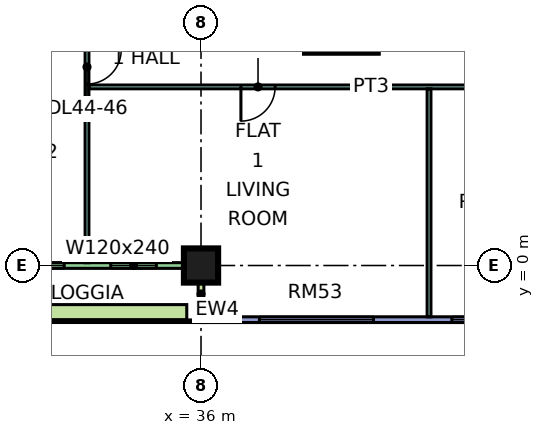
"""IFC4 building model, lengths in metres.
Left out: names, types, materials, properties, quantities, classifications, styles, units other than length and angle.
Written with IfcOpenShell. Run it as: python <this file> out.ifc"""

import sys

from ifc_helpers import new_model, si_unit, direction, frame, frame_2d, origin, origin_2d, place, context, subcontext, project, spatial, rectangle, extrude, element, fill, save


model = new_model("IFC4")
c1 = context("Model", 3, precision=1e-05, world=origin(), true_north=direction((0.0, 1.0)))
c2 = subcontext(c1, "Body", "Model", "MODEL_VIEW")
j1 = project(units=[si_unit("LENGTHUNIT", "METRE"), si_unit("PLANEANGLEUNIT", "RADIAN")], contexts=[c1])
p1 = place(None, origin())
s1 = spatial("IfcSite", under=j1, at=p1, CompositionType="ELEMENT")
p2 = place(p1, origin())
s2 = spatial("IfcBuilding", under=s1, at=p2, CompositionType="ELEMENT")
p3 = place(p2, frame((0.0, 0.0, 191.15)))
s3 = spatial("IfcBuildingStorey", under=s2, at=p3, CompositionType="ELEMENT", Elevation=191.15)
p4 = place(p3, frame((36.0, 0.0, 0.0), z_axis=(0.0, 0.0, 1.0), x_axis=(1.0, 0.0, 0.0)))
e1 = element("IfcColumn", 1, at=p4, inside=s3, PredefinedType="COLUMN", context=c2, shape_type="SweptSolid", body=[
    extrude(rectangle(XDim=0.9, YDim=0.9, at=origin_2d()), origin(), (0.0, 0.0, 1.0), 3.75),
])
p5 = place(p3, frame((37.2, 5.725, 0.0), z_axis=(0.0, 0.0, 1.0), x_axis=(1.0, 0.0, 0.0)))
e2 = element("IfcWall", 2, at=p5, inside=s3, PredefinedType="SHEAR", context=c2, shape_type="SweptSolid", body=[
    extrude(rectangle(XDim=3.45, YDim=0.25, at=frame_2d((1.725, 0.0))), origin(), (0.0, 0.0, 1.0), 3.75),
])
p6 = place(p3, frame((24.075, 0.0, 0.0), z_axis=(0.0, 0.0, 1.0), x_axis=(1.0, 0.0, 0.0)))
e3 = element("IfcWall", 3, at=p6, inside=s3, PredefinedType="SOLIDWALL", context=c2, shape_type="SweptSolid", body=[
    extrude(rectangle(XDim=11.85, YDim=0.15, at=frame_2d((5.925, 0.0))), origin(), (0.0, 0.0, 1.0), 3.35),
])
p7 = place(p6, frame((1.1, 0.0, 0.0)))
e4 = element("IfcOpeningElement", 4, at=p7, cuts=e3, PredefinedType="OPENING", context=c2, shape_type="SweptSolid", body=[
    extrude(rectangle(XDim=1.2, YDim=2.4, at=frame_2d((0.6, 1.2))), frame((0.0, 0.085, 0.0), z_axis=(0.0, -1.0, 0.0), x_axis=(1.0, 0.0, 0.0)), (0.0, 0.0, 1.0), 0.17),
])
p8 = place(p6, frame((3.525, 0.0, 0.45)))
e5 = element("IfcOpeningElement", 5, at=p8, cuts=e3, PredefinedType="OPENING", context=c2, shape_type="SweptSolid", body=[
    extrude(rectangle(XDim=1.8, YDim=2.4, at=frame_2d((0.9, 1.2))), frame((0.0, 0.085, 0.0), z_axis=(0.0, -1.0, 0.0), x_axis=(1.0, 0.0, 0.0)), (0.0, 0.0, 1.0), 0.17),
])
p9 = place(p6, frame((6.525, 0.0, 0.45)))
e6 = element("IfcOpeningElement", 6, at=p9, cuts=e3, PredefinedType="OPENING", context=c2, shape_type="SweptSolid", body=[
    extrude(rectangle(XDim=1.8, YDim=2.4, at=frame_2d((0.9, 1.2))), frame((0.0, 0.085, 0.0), z_axis=(0.0, -1.0, 0.0), x_axis=(1.0, 0.0, 0.0)), (0.0, 0.0, 1.0), 0.17),
])
p10 = place(p6, frame((9.55, 0.0, 0.45)))
e7 = element("IfcOpeningElement", 7, at=p10, cuts=e3, PredefinedType="OPENING", context=c2, shape_type="SweptSolid", body=[
    extrude(rectangle(XDim=1.2, YDim=2.4, at=frame_2d((0.6, 1.2))), frame((0.0, 0.085, 0.0), z_axis=(0.0, -1.0, 0.0), x_axis=(1.0, 0.0, 0.0)), (0.0, 0.0, 1.0), 0.17),
])
p11 = place(p3, frame((36.0, -1.5, 0.0), z_axis=(0.0, 0.0, 1.0), x_axis=(0.0, 1.0, 0.0)))
e8 = element("IfcWall", 8, at=p11, inside=s3, PredefinedType="SOLIDWALL", context=c2, shape_type="SweptSolid", body=[
    extrude(rectangle(XDim=1.5, YDim=0.15, at=frame_2d((0.75, 0.0))), origin(), (0.0, 0.0, 1.0), 3.35),
])
p12 = place(p3, frame((36.075, -1.425, 0.0), z_axis=(0.0, 0.0, 1.0), x_axis=(1.0, 0.0, 0.0)))
e9 = element("IfcWall", 9, at=p12, inside=s3, PredefinedType="SOLIDWALL", context=c2, shape_type="SweptSolid", body=[
    extrude(rectangle(XDim=11.85, YDim=0.15, at=frame_2d((5.925, 0.0))), origin(), (0.0, 0.0, 1.0), 3.35),
])
p13 = place(p12, frame((1.462, 0.0, 0.45)))
e10 = element("IfcOpeningElement", 10, at=p13, cuts=e9, PredefinedType="OPENING", context=c2, shape_type="SweptSolid", body=[
    extrude(rectangle(XDim=3.0, YDim=2.4, at=frame_2d((1.5, 1.2))), frame((0.0, 0.085, 0.0), z_axis=(0.0, -1.0, 0.0), x_axis=(1.0, 0.0, 0.0)), (0.0, 0.0, 1.0), 0.17),
])
p14 = place(p12, frame((6.525, 0.0, 0.45)))
e11 = element("IfcOpeningElement", 11, at=p14, cuts=e9, PredefinedType="OPENING", context=c2, shape_type="SweptSolid", body=[
    extrude(rectangle(XDim=1.8, YDim=2.4, at=frame_2d((0.9, 1.2))), frame((0.0, 0.085, 0.0), z_axis=(0.0, -1.0, 0.0), x_axis=(1.0, 0.0, 0.0)), (0.0, 0.0, 1.0), 0.17),
])
p15 = place(p12, frame((9.488, 0.0, 0.45)))
e12 = element("IfcOpeningElement", 12, at=p15, cuts=e9, PredefinedType="OPENING", context=c2, shape_type="SweptSolid", body=[
    extrude(rectangle(XDim=1.8, YDim=2.4, at=frame_2d((0.9, 1.2))), frame((0.0, 0.085, 0.0), z_axis=(0.0, -1.0, 0.0), x_axis=(1.0, 0.0, 0.0)), (0.0, 0.0, 1.0), 0.17),
])
p16 = place(p3, frame((24.375, -1.229, 0.0), z_axis=(0.0, 0.0, 1.0), x_axis=(1.0, 0.0, 0.0)))
e13 = element("IfcWall", 13, at=p16, inside=s3, PredefinedType="SOLIDWALL", context=c2, shape_type="SweptSolid", body=[
    extrude(rectangle(XDim=11.25, YDim=0.4, at=frame_2d((5.625, 0.0))), origin(), (0.0, 0.0, 1.0), 0.7),
])
p17 = place(p3, frame((33.0, 0.074, 0.0), z_axis=(0.0, 0.0, 1.0), x_axis=(0.0, 1.0, 0.0)))
e14 = element("IfcWall", 14, at=p17, inside=s3, PredefinedType="PARTITIONING", context=c2, shape_type="SweptSolid", body=[
    extrude(rectangle(XDim=5.751, YDim=0.1, at=frame_2d((2.875, 0.0))), origin(), (0.0, 0.0, 1.0), 3.35),
])
p18 = place(p17, frame((4.701, 0.0, 0.0)))
e15 = element("IfcOpeningElement", 15, at=p18, cuts=e14, PredefinedType="OPENING", context=c2, shape_type="SweptSolid", body=[
    extrude(rectangle(XDim=0.9, YDim=2.1, at=frame_2d((0.45, 1.05))), frame((0.0, 0.06, 0.0), z_axis=(0.0, -1.0, 0.0), x_axis=(1.0, 0.0, 0.0)), (0.0, 0.0, 1.0), 0.12),
])
p19 = place(p3, frame((33.05, 4.7, 0.0), z_axis=(0.0, 0.0, 1.0), x_axis=(1.0, 0.0, 0.0)))
e16 = element("IfcWall", 16, at=p19, inside=s3, PredefinedType="PARTITIONING", context=c2, shape_type="SweptSolid", body=[
    extrude(rectangle(XDim=14.85, YDim=0.1, at=frame_2d((7.425, 0.0))), origin(), (0.0, 0.0, 1.0), 3.35),
])
p20 = place(p19, frame((10.0, 0.0, 0.0)))
e17 = element("IfcOpeningElement", 17, at=p20, cuts=e16, PredefinedType="OPENING", context=c2, shape_type="SweptSolid", body=[
    extrude(rectangle(XDim=0.9, YDim=2.1, at=frame_2d((0.45, 1.05))), frame((0.0, 0.06, 0.0), z_axis=(0.0, -1.0, 0.0), x_axis=(1.0, 0.0, 0.0)), (0.0, 0.0, 1.0), 0.12),
])
p21 = place(p19, frame((13.0, 0.0, 0.0)))
e18 = element("IfcOpeningElement", 18, at=p21, cuts=e16, PredefinedType="OPENING", context=c2, shape_type="SweptSolid", body=[
    extrude(rectangle(XDim=0.9, YDim=2.1, at=frame_2d((0.45, 1.05))), frame((0.0, 0.06, 0.0), z_axis=(0.0, -1.0, 0.0), x_axis=(1.0, 0.0, 0.0)), (0.0, 0.0, 1.0), 0.12),
])
p22 = place(p19, frame((4.0, 0.0, 0.0)))
e19 = element("IfcOpeningElement", 19, at=p22, cuts=e16, PredefinedType="OPENING", context=c2, shape_type="SweptSolid", body=[
    extrude(rectangle(XDim=0.9, YDim=2.1, at=frame_2d((0.45, 1.05))), frame((0.0, 0.06, 0.0), z_axis=(0.0, -1.0, 0.0), x_axis=(1.0, 0.0, 0.0)), (0.0, 0.0, 1.0), 0.12),
])
p23 = place(p3, frame((42.0, -1.35, 0.0), z_axis=(0.0, 0.0, 1.0), x_axis=(0.0, 1.0, 0.0)))
e20 = element("IfcWall", 20, at=p23, inside=s3, PredefinedType="PARTITIONING", context=c2, shape_type="SweptSolid", body=[
    extrude(rectangle(XDim=6.0, YDim=0.1, at=frame_2d((3.0, 0.0))), origin(), (0.0, 0.0, 1.0), 3.35),
])
p24 = place(p9, origin())
e21 = element("IfcWindow", 21, at=p24, inside=s3, PartitioningType="SINGLE_PANEL", PredefinedType="WINDOW", context=c2, shape_type="SweptSolid", body=[
    extrude(rectangle(XDim=1.8, YDim=2.4, at=frame_2d((0.9, 1.2))), frame((0.0, 0.03, 0.0), z_axis=(0.0, -1.0, 0.0), x_axis=(1.0, 0.0, 0.0)), (0.0, 0.0, 1.0), 0.06),
])
fill(e6, e21)
p25 = place(p10, origin())
e22 = element("IfcWindow", 22, at=p25, inside=s3, PartitioningType="SINGLE_PANEL", PredefinedType="WINDOW", context=c2, shape_type="SweptSolid", body=[
    extrude(rectangle(XDim=1.2, YDim=2.4, at=frame_2d((0.6, 1.2))), frame((0.0, 0.03, 0.0), z_axis=(0.0, -1.0, 0.0), x_axis=(1.0, 0.0, 0.0)), (0.0, 0.0, 1.0), 0.06),
])
fill(e7, e22)
p26 = place(p13, origin())
e23 = element("IfcWindow", 23, at=p26, inside=s3, PartitioningType="SINGLE_PANEL", PredefinedType="WINDOW", context=c2, shape_type="SweptSolid", body=[
    extrude(rectangle(XDim=3.0, YDim=2.4, at=frame_2d((1.5, 1.2))), frame((0.0, 0.03, 0.0), z_axis=(0.0, -1.0, 0.0), x_axis=(1.0, 0.0, 0.0)), (0.0, 0.0, 1.0), 0.06),
])
fill(e10, e23)
p27 = place(p14, origin())
e24 = element("IfcWindow", 24, at=p27, inside=s3, PartitioningType="SINGLE_PANEL", PredefinedType="WINDOW", context=c2, shape_type="SweptSolid", body=[
    extrude(rectangle(XDim=1.8, YDim=2.4, at=frame_2d((0.9, 1.2))), frame((0.0, 0.03, 0.0), z_axis=(0.0, -1.0, 0.0), x_axis=(1.0, 0.0, 0.0)), (0.0, 0.0, 1.0), 0.06),
])
fill(e11, e24)
p28 = place(p18, origin())
e25 = element("IfcDoor", 25, at=p28, inside=s3, OperationType="SINGLE_SWING_RIGHT", PredefinedType="DOOR", context=c2, shape_type="SweptSolid", body=[
    extrude(rectangle(XDim=0.9, YDim=2.1, at=frame_2d((0.45, 1.05))), frame((0.0, 0.025, 0.0), z_axis=(0.0, -1.0, 0.0), x_axis=(1.0, 0.0, 0.0)), (0.0, 0.0, 1.0), 0.05),
])
fill(e15, e25)
p29 = place(p22, frame((0.9, 0.0, 0.0), z_axis=(0.0, 0.0, 1.0), x_axis=(-1.0, 0.0, 0.0)))
e26 = element("IfcDoor", 26, at=p29, inside=s3, OperationType="SINGLE_SWING_LEFT", PredefinedType="DOOR", context=c2, shape_type="SweptSolid", body=[
    extrude(rectangle(XDim=0.9, YDim=2.1, at=frame_2d((0.45, 1.05))), frame((0.0, 0.025, 0.0), z_axis=(0.0, -1.0, 0.0), x_axis=(1.0, 0.0, 0.0)), (0.0, 0.0, 1.0), 0.05),
])
fill(e19, e26)
save(model, sys.argv[1])
